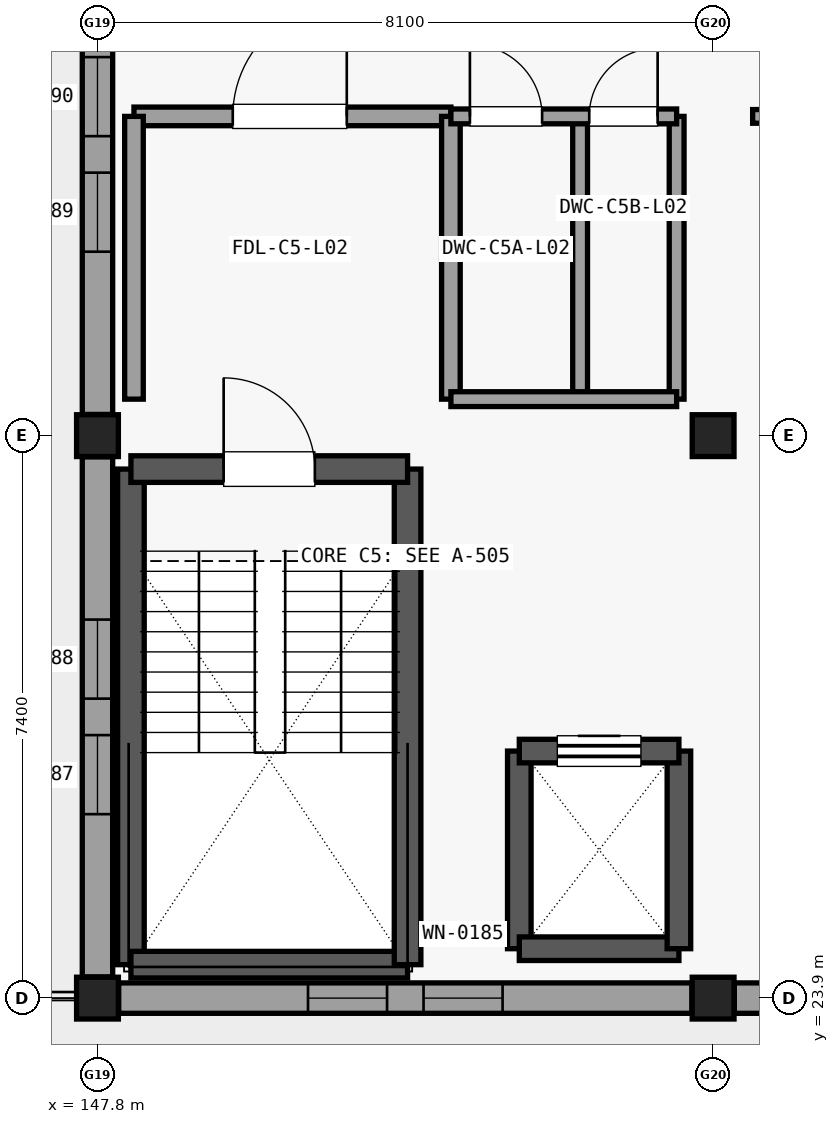
"""IFC4 building model, lengths in metres.
Left out: names, types, materials, properties, quantities, classifications, styles, units other than length and angle.
Written with IfcOpenShell. Run it as: python <this file> out.ifc"""

import sys

from ifc_helpers import new_model, si_unit, direction, frame, frame_2d, origin, origin_2d, place, context, subcontext, project, spatial, rectangle, extrude, element, fill, save


model = new_model("IFC4")
c1 = context("Model", 3, precision=1e-05, world=origin(), true_north=direction((0.0, 1.0)))
c2 = subcontext(c1, "Body", "Model", "MODEL_VIEW")
j1 = project(units=[si_unit("LENGTHUNIT", "METRE"), si_unit("PLANEANGLEUNIT", "RADIAN")], contexts=[c1])
p1 = place(None, origin())
s1 = spatial("IfcSite", under=j1, at=p1, CompositionType="ELEMENT")
p2 = place(p1, origin())
s2 = spatial("IfcBuilding", under=s1, at=p2, CompositionType="ELEMENT")
p3 = place(p2, frame((0.0, 0.0, 10.2)))
s3 = spatial("IfcBuildingStorey", under=s2, at=p3, CompositionType="ELEMENT", Elevation=10.2)
for number, where, z_axis, x_axis in (
    (1, (147.8, 23.9, 0.0), (0.0, 0.0, 1.0), (1.0, 0.0, 0.0)),
    (2, (147.8, 31.3, 0.0), (0.0, 0.0, 1.0), (1.0, 0.0, 0.0)),
    (3, (155.9, 23.9, 0.0), (0.0, 0.0, 1.0), (1.0, 0.0, 0.0)),
    (4, (155.9, 31.3, 0.0), (0.0, 0.0, 1.0), (1.0, 0.0, 0.0)),
):
    element("IfcColumn", number, at=place(p3, frame(where, z_axis=z_axis, x_axis=x_axis)), inside=s3, PredefinedType="COLUMN", context=c2, shape_type="SweptSolid", body=[
        extrude(rectangle(XDim=0.55, YDim=0.55, at=origin_2d()), origin(), (0.0, 0.0, 1.0), 3.37),
    ])
p4 = place(p3, frame((155.621, 23.9, 0.0), z_axis=(0.0, 0.0, 1.0), x_axis=(-1.0, 0.0, 0.0)))
e5 = element("IfcWall", 5, at=p4, inside=s3, PredefinedType="SOLIDWALL", context=c2, shape_type="SweptSolid", body=[
    extrude(rectangle(XDim=7.542, YDim=0.4, at=frame_2d((3.771, 0.0))), origin(), (0.0, 0.0, 1.0), 2.898),
])
p5 = place(p4, frame((2.491, 0.0, 0.6)))
e6 = element("IfcOpeningElement", 6, at=p5, cuts=e5, PredefinedType="OPENING", context=c2, shape_type="SweptSolid", body=[
    extrude(rectangle(XDim=1.04, YDim=2.06, at=frame_2d((0.52, 1.03))), frame((0.0, 0.21, 0.0), z_axis=(0.0, -1.0, 0.0), x_axis=(1.0, 0.0, 0.0)), (0.0, 0.0, 1.0), 0.42),
])
p6 = place(p4, frame((4.011, 0.0, 0.6)))
e7 = element("IfcOpeningElement", 7, at=p6, cuts=e5, PredefinedType="OPENING", context=c2, shape_type="SweptSolid", body=[
    extrude(rectangle(XDim=1.04, YDim=2.06, at=frame_2d((0.52, 1.03))), frame((0.0, 0.21, 0.0), z_axis=(0.0, -1.0, 0.0), x_axis=(1.0, 0.0, 0.0)), (0.0, 0.0, 1.0), 0.42),
])
p7 = place(p3, frame((147.8, 24.179, 0.0), z_axis=(0.0, 0.0, 1.0), x_axis=(0.0, 1.0, 0.0)))
e8 = element("IfcWall", 8, at=p7, inside=s3, PredefinedType="SOLIDWALL", context=c2, shape_type="SweptSolid", body=[
    extrude(rectangle(XDim=6.842, YDim=0.4, at=frame_2d((3.421, 0.0))), origin(), (0.0, 0.0, 1.0), 2.898),
])
p8 = place(p7, frame((2.141, 0.0, 0.6)))
e9 = element("IfcOpeningElement", 9, at=p8, cuts=e8, PredefinedType="OPENING", context=c2, shape_type="SweptSolid", body=[
    extrude(rectangle(XDim=1.04, YDim=2.06, at=frame_2d((0.52, 1.03))), frame((0.0, 0.21, 0.0), z_axis=(0.0, -1.0, 0.0), x_axis=(1.0, 0.0, 0.0)), (0.0, 0.0, 1.0), 0.42),
])
p9 = place(p7, frame((3.661, 0.0, 0.6)))
e10 = element("IfcOpeningElement", 10, at=p9, cuts=e8, PredefinedType="OPENING", context=c2, shape_type="SweptSolid", body=[
    extrude(rectangle(XDim=1.04, YDim=2.06, at=frame_2d((0.52, 1.03))), frame((0.0, 0.21, 0.0), z_axis=(0.0, -1.0, 0.0), x_axis=(1.0, 0.0, 0.0)), (0.0, 0.0, 1.0), 0.42),
])
p10 = place(p3, frame((147.8, 31.579, 0.0), z_axis=(0.0, 0.0, 1.0), x_axis=(0.0, 1.0, 0.0)))
e11 = element("IfcWall", 11, at=p10, inside=s3, PredefinedType="SOLIDWALL", context=c2, shape_type="SweptSolid", body=[
    extrude(rectangle(XDim=6.842, YDim=0.4, at=frame_2d((3.421, 0.0))), origin(), (0.0, 0.0, 1.0), 2.898),
])
p11 = place(p10, frame((2.141, 0.0, 0.6)))
e12 = element("IfcOpeningElement", 12, at=p11, cuts=e11, PredefinedType="OPENING", context=c2, shape_type="SweptSolid", body=[
    extrude(rectangle(XDim=1.04, YDim=2.06, at=frame_2d((0.52, 1.03))), frame((0.0, 0.21, 0.0), z_axis=(0.0, -1.0, 0.0), x_axis=(1.0, 0.0, 0.0)), (0.0, 0.0, 1.0), 0.42),
])
p12 = place(p10, frame((3.661, 0.0, 0.6)))
e13 = element("IfcOpeningElement", 13, at=p12, cuts=e11, PredefinedType="OPENING", context=c2, shape_type="SweptSolid", body=[
    extrude(rectangle(XDim=1.04, YDim=2.06, at=frame_2d((0.52, 1.03))), frame((0.0, 0.21, 0.0), z_axis=(0.0, -1.0, 0.0), x_axis=(1.0, 0.0, 0.0)), (0.0, 0.0, 1.0), 0.42),
])
p13 = place(p3, frame((163.721, 23.9, 0.0), z_axis=(0.0, 0.0, 1.0), x_axis=(-1.0, 0.0, 0.0)))
e14 = element("IfcWall", 14, at=p13, inside=s3, PredefinedType="SOLIDWALL", context=c2, shape_type="SweptSolid", body=[
    extrude(rectangle(XDim=7.542, YDim=0.4, at=frame_2d((3.771, 0.0))), origin(), (0.0, 0.0, 1.0), 2.898),
])
p14 = place(p13, frame((2.491, 0.0, 0.6)))
e15 = element("IfcOpeningElement", 15, at=p14, cuts=e14, PredefinedType="OPENING", context=c2, shape_type="SweptSolid", body=[
    extrude(rectangle(XDim=1.04, YDim=2.06, at=frame_2d((0.52, 1.03))), frame((0.0, 0.21, 0.0), z_axis=(0.0, -1.0, 0.0), x_axis=(1.0, 0.0, 0.0)), (0.0, 0.0, 1.0), 0.42),
])
p15 = place(p13, frame((4.011, 0.0, 0.6)))
e16 = element("IfcOpeningElement", 16, at=p15, cuts=e14, PredefinedType="OPENING", context=c2, shape_type="SweptSolid", body=[
    extrude(rectangle(XDim=1.04, YDim=2.06, at=frame_2d((0.52, 1.03))), frame((0.0, 0.21, 0.0), z_axis=(0.0, -1.0, 0.0), x_axis=(1.0, 0.0, 0.0)), (0.0, 0.0, 1.0), 0.42),
])
p16 = place(p3, frame((148.24, 24.34, 0.0), z_axis=(0.0, 0.0, 1.0), x_axis=(0.0, 1.0, 0.0)))
e17 = element("IfcWall", 17, at=p16, inside=s3, PredefinedType="SHEAR", context=c2, shape_type="SweptSolid", body=[
    extrude(rectangle(XDim=6.52, YDim=0.35, at=frame_2d((3.26, 0.0))), origin(), (0.0, 0.0, 1.0), 3.365),
])
p17 = place(p3, frame((148.24, 24.34, 0.0), z_axis=(0.0, 0.0, 1.0), x_axis=(1.0, 0.0, 0.0)))
e18 = element("IfcWall", 18, at=p17, inside=s3, PredefinedType="SHEAR", context=c2, shape_type="SweptSolid", body=[
    extrude(rectangle(XDim=3.64, YDim=0.35, at=frame_2d((1.82, 0.0))), origin(), (0.0, 0.0, 1.0), 3.365),
])
p18 = place(p3, frame((151.88, 24.34, 0.0), z_axis=(0.0, 0.0, 1.0), x_axis=(0.0, 1.0, 0.0)))
e19 = element("IfcWall", 19, at=p18, inside=s3, PredefinedType="SHEAR", context=c2, shape_type="SweptSolid", body=[
    extrude(rectangle(XDim=6.52, YDim=0.35, at=frame_2d((3.26, 0.0))), origin(), (0.0, 0.0, 1.0), 3.365),
])
p19 = place(p3, frame((148.24, 30.86, 0.0), z_axis=(0.0, 0.0, 1.0), x_axis=(1.0, 0.0, 0.0)))
e20 = element("IfcWall", 20, at=p19, inside=s3, PredefinedType="SHEAR", context=c2, shape_type="SweptSolid", body=[
    extrude(rectangle(XDim=3.64, YDim=0.35, at=frame_2d((1.82, 0.0))), origin(), (0.0, 0.0, 1.0), 3.365),
])
p20 = place(p19, frame((1.22, 0.0, 0.0)))
e21 = element("IfcOpeningElement", 21, at=p20, cuts=e20, PredefinedType="OPENING", context=c2, shape_type="SweptSolid", body=[
    extrude(rectangle(XDim=1.2, YDim=2.15, at=frame_2d((0.6, 1.075))), frame((0.0, 0.185, 0.0), z_axis=(0.0, -1.0, 0.0), x_axis=(1.0, 0.0, 0.0)), (0.0, 0.0, 1.0), 0.37),
])
p21 = place(p3, frame((153.35, 24.55, 0.0), z_axis=(0.0, 0.0, 1.0), x_axis=(0.0, 1.0, 0.0)))
e22 = element("IfcWall", 22, at=p21, inside=s3, PredefinedType="SHEAR", context=c2, shape_type="SweptSolid", body=[
    extrude(rectangle(XDim=2.6, YDim=0.31, at=frame_2d((1.3, 0.0))), origin(), (0.0, 0.0, 1.0), 3.365),
])
p22 = place(p3, frame((153.35, 24.55, 0.0), z_axis=(0.0, 0.0, 1.0), x_axis=(1.0, 0.0, 0.0)))
e23 = element("IfcWall", 23, at=p22, inside=s3, PredefinedType="SHEAR", context=c2, shape_type="SweptSolid", body=[
    extrude(rectangle(XDim=2.1, YDim=0.31, at=frame_2d((1.05, 0.0))), origin(), (0.0, 0.0, 1.0), 3.365),
])
p23 = place(p3, frame((155.45, 24.55, 0.0), z_axis=(0.0, 0.0, 1.0), x_axis=(0.0, 1.0, 0.0)))
e24 = element("IfcWall", 24, at=p23, inside=s3, PredefinedType="SHEAR", context=c2, shape_type="SweptSolid", body=[
    extrude(rectangle(XDim=2.6, YDim=0.31, at=frame_2d((1.3, 0.0))), origin(), (0.0, 0.0, 1.0), 3.365),
])
p24 = place(p3, frame((153.35, 27.15, 0.0), z_axis=(0.0, 0.0, 1.0), x_axis=(1.0, 0.0, 0.0)))
e25 = element("IfcWall", 25, at=p24, inside=s3, PredefinedType="SHEAR", context=c2, shape_type="SweptSolid", body=[
    extrude(rectangle(XDim=2.1, YDim=0.31, at=frame_2d((1.05, 0.0))), origin(), (0.0, 0.0, 1.0), 3.365),
])
p25 = place(p24, frame((0.5, 0.0, 0.0)))
e26 = element("IfcOpeningElement", 26, at=p25, cuts=e25, PredefinedType="OPENING", context=c2, shape_type="SweptSolid", body=[
    extrude(rectangle(XDim=1.1, YDim=2.15, at=frame_2d((0.55, 1.075))), frame((0.0, 0.165, 0.0), z_axis=(0.0, -1.0, 0.0), x_axis=(1.0, 0.0, 0.0)), (0.0, 0.0, 1.0), 0.33),
])
p26 = place(p3, frame((148.28, 35.5, 0.0), z_axis=(0.0, 0.0, 1.0), x_axis=(1.0, 0.0, 0.0)))
e27 = element("IfcWall", 27, at=p26, inside=s3, PredefinedType="PARTITIONING", context=c2, shape_type="SweptSolid", body=[
    extrude(rectangle(XDim=4.17, YDim=0.245, at=frame_2d((2.085, 0.0))), origin(), (0.0, 0.0, 1.0), 2.903),
])
p27 = place(p26, frame((1.3, 0.0, 0.0)))
e28 = element("IfcOpeningElement", 28, at=p27, cuts=e27, PredefinedType="OPENING", context=c2, shape_type="SweptSolid", body=[
    extrude(rectangle(XDim=1.5, YDim=2.15, at=frame_2d((0.75, 1.075))), frame((0.0, 0.133, 0.0), z_axis=(0.0, -1.0, 0.0), x_axis=(1.0, 0.0, 0.0)), (0.0, 0.0, 1.0), 0.265),
])
for number, where, z_axis, x_axis in (
    (29, (148.28, 31.78, 0.0), (0.0, 0.0, 1.0), (0.0, 1.0, 0.0)),
    (30, (152.45, 31.78, 0.0), (0.0, 0.0, 1.0), (0.0, 1.0, 0.0)),
):
    element("IfcWall", number, at=place(p3, frame(where, z_axis=z_axis, x_axis=x_axis)), inside=s3, PredefinedType="PARTITIONING", context=c2, shape_type="SweptSolid", body=[
        extrude(rectangle(XDim=3.72, YDim=0.245, at=frame_2d((1.86, 0.0))), origin(), (0.0, 0.0, 1.0), 2.903),
    ])
for number, where, z_axis, x_axis in (
    (31, (154.15, 31.78, 0.0), (0.0, 0.0, 1.0), (0.0, 1.0, 0.0)),
    (32, (155.42, 31.78, 0.0), (0.0, 0.0, 1.0), (0.0, 1.0, 0.0)),
):
    element("IfcWall", number, at=place(p3, frame(where, z_axis=z_axis, x_axis=x_axis)), inside=s3, PredefinedType="PARTITIONING", context=c2, shape_type="SweptSolid", body=[
        extrude(rectangle(XDim=3.72, YDim=0.195, at=frame_2d((1.86, 0.0))), origin(), (0.0, 0.0, 1.0), 2.903),
    ])
p28 = place(p3, frame((152.45, 31.78, 0.0), z_axis=(0.0, 0.0, 1.0), x_axis=(1.0, 0.0, 0.0)))
e33 = element("IfcWall", 33, at=p28, inside=s3, PredefinedType="PARTITIONING", context=c2, shape_type="SweptSolid", body=[
    extrude(rectangle(XDim=2.97, YDim=0.195, at=frame_2d((1.485, 0.0))), origin(), (0.0, 0.0, 1.0), 2.903),
])
p29 = place(p3, frame((152.45, 35.5, 0.0), z_axis=(0.0, 0.0, 1.0), x_axis=(1.0, 0.0, 0.0)))
e34 = element("IfcWall", 34, at=p29, inside=s3, PredefinedType="PARTITIONING", context=c2, shape_type="SweptSolid", body=[
    extrude(rectangle(XDim=2.97, YDim=0.195, at=frame_2d((1.485, 0.0))), origin(), (0.0, 0.0, 1.0), 2.903),
])
p30 = place(p29, frame((0.25, 0.0, 0.0)))
e35 = element("IfcOpeningElement", 35, at=p30, cuts=e34, PredefinedType="OPENING", context=c2, shape_type="SweptSolid", body=[
    extrude(rectangle(XDim=0.95, YDim=2.1, at=frame_2d((0.475, 1.05))), frame((0.0, 0.107, 0.0), z_axis=(0.0, -1.0, 0.0), x_axis=(1.0, 0.0, 0.0)), (0.0, 0.0, 1.0), 0.215),
])
p31 = place(p29, frame((1.82, 0.0, 0.0)))
e36 = element("IfcOpeningElement", 36, at=p31, cuts=e34, PredefinedType="OPENING", context=c2, shape_type="SweptSolid", body=[
    extrude(rectangle(XDim=0.9, YDim=2.1, at=frame_2d((0.45, 1.05))), frame((0.0, 0.107, 0.0), z_axis=(0.0, -1.0, 0.0), x_axis=(1.0, 0.0, 0.0)), (0.0, 0.0, 1.0), 0.215),
])
p32 = place(p3, frame((156.42, 35.5, 0.0), z_axis=(0.0, 0.0, 1.0), x_axis=(1.0, 0.0, 0.0)))
e37 = element("IfcWall", 37, at=p32, inside=s3, PredefinedType="PARTITIONING", context=c2, shape_type="SweptSolid", body=[
    extrude(rectangle(XDim=7.06, YDim=0.18, at=frame_2d((3.53, 0.0))), origin(), (0.0, 0.0, 1.0), 2.903),
])
p33 = place(p32, frame((2.955, 0.0, 0.0)))
e38 = element("IfcOpeningElement", 38, at=p33, cuts=e37, PredefinedType="OPENING", context=c2, shape_type="SweptSolid", body=[
    extrude(rectangle(XDim=1.15, YDim=2.15, at=frame_2d((0.575, 1.075))), frame((0.0, 0.1, 0.0), z_axis=(0.0, -1.0, 0.0), x_axis=(1.0, 0.0, 0.0)), (0.0, 0.0, 1.0), 0.2),
])
p34 = place(p5, origin())
e39 = element("IfcWindow", 39, at=p34, inside=s3, PartitioningType="SINGLE_PANEL", PredefinedType="WINDOW", context=c2, shape_type="SweptSolid", body=[
    extrude(rectangle(XDim=1.04, YDim=2.06, at=frame_2d((0.52, 1.03))), frame((0.0, 0.03, 0.0), z_axis=(0.0, -1.0, 0.0), x_axis=(1.0, 0.0, 0.0)), (0.0, 0.0, 1.0), 0.06),
])
fill(e6, e39)
p35 = place(p6, origin())
e40 = element("IfcWindow", 40, at=p35, inside=s3, PartitioningType="SINGLE_PANEL", PredefinedType="WINDOW", context=c2, shape_type="SweptSolid", body=[
    extrude(rectangle(XDim=1.04, YDim=2.06, at=frame_2d((0.52, 1.03))), frame((0.0, 0.03, 0.0), z_axis=(0.0, -1.0, 0.0), x_axis=(1.0, 0.0, 0.0)), (0.0, 0.0, 1.0), 0.06),
])
fill(e7, e40)
p36 = place(p8, origin())
e41 = element("IfcWindow", 41, at=p36, inside=s3, PartitioningType="SINGLE_PANEL", PredefinedType="WINDOW", context=c2, shape_type="SweptSolid", body=[
    extrude(rectangle(XDim=1.04, YDim=2.06, at=frame_2d((0.52, 1.03))), frame((0.0, 0.03, 0.0), z_axis=(0.0, -1.0, 0.0), x_axis=(1.0, 0.0, 0.0)), (0.0, 0.0, 1.0), 0.06),
])
fill(e9, e41)
p37 = place(p9, origin())
e42 = element("IfcWindow", 42, at=p37, inside=s3, PartitioningType="SINGLE_PANEL", PredefinedType="WINDOW", context=c2, shape_type="SweptSolid", body=[
    extrude(rectangle(XDim=1.04, YDim=2.06, at=frame_2d((0.52, 1.03))), frame((0.0, 0.03, 0.0), z_axis=(0.0, -1.0, 0.0), x_axis=(1.0, 0.0, 0.0)), (0.0, 0.0, 1.0), 0.06),
])
fill(e10, e42)
p38 = place(p11, origin())
e43 = element("IfcWindow", 43, at=p38, inside=s3, PartitioningType="SINGLE_PANEL", PredefinedType="WINDOW", context=c2, shape_type="SweptSolid", body=[
    extrude(rectangle(XDim=1.04, YDim=2.06, at=frame_2d((0.52, 1.03))), frame((0.0, 0.03, 0.0), z_axis=(0.0, -1.0, 0.0), x_axis=(1.0, 0.0, 0.0)), (0.0, 0.0, 1.0), 0.06),
])
fill(e12, e43)
p39 = place(p12, origin())
e44 = element("IfcWindow", 44, at=p39, inside=s3, PartitioningType="SINGLE_PANEL", PredefinedType="WINDOW", context=c2, shape_type="SweptSolid", body=[
    extrude(rectangle(XDim=1.04, YDim=2.06, at=frame_2d((0.52, 1.03))), frame((0.0, 0.03, 0.0), z_axis=(0.0, -1.0, 0.0), x_axis=(1.0, 0.0, 0.0)), (0.0, 0.0, 1.0), 0.06),
])
fill(e13, e44)
p40 = place(p20, origin())
e45 = element("IfcDoor", 45, at=p40, inside=s3, OperationType="SINGLE_SWING_LEFT", PredefinedType="DOOR", context=c2, shape_type="SweptSolid", body=[
    extrude(rectangle(XDim=1.2, YDim=2.15, at=frame_2d((0.6, 1.075))), frame((0.0, 0.025, 0.0), z_axis=(0.0, -1.0, 0.0), x_axis=(1.0, 0.0, 0.0)), (0.0, 0.0, 1.0), 0.05),
])
fill(e21, e45)
p41 = place(p25, origin())
e46 = element("IfcDoor", 46, at=p41, inside=s3, OperationType="SLIDING_TO_LEFT", PredefinedType="DOOR", context=c2, shape_type="SweptSolid", body=[
    extrude(rectangle(XDim=1.1, YDim=2.15, at=frame_2d((0.55, 1.075))), frame((0.0, 0.025, 0.0), z_axis=(0.0, -1.0, 0.0), x_axis=(1.0, 0.0, 0.0)), (0.0, 0.0, 1.0), 0.05),
])
fill(e26, e46)
p42 = place(p27, origin())
e47 = element("IfcDoor", 47, at=p42, inside=s3, OperationType="SINGLE_SWING_RIGHT", PredefinedType="DOOR", context=c2, shape_type="SweptSolid", body=[
    extrude(rectangle(XDim=1.5, YDim=2.15, at=frame_2d((0.75, 1.075))), frame((0.0, 0.025, 0.0), z_axis=(0.0, -1.0, 0.0), x_axis=(1.0, 0.0, 0.0)), (0.0, 0.0, 1.0), 0.05),
])
fill(e28, e47)
p43 = place(p30, origin())
e48 = element("IfcDoor", 48, at=p43, inside=s3, OperationType="SINGLE_SWING_LEFT", PredefinedType="DOOR", context=c2, shape_type="SweptSolid", body=[
    extrude(rectangle(XDim=0.95, YDim=2.1, at=frame_2d((0.475, 1.05))), frame((0.0, 0.025, 0.0), z_axis=(0.0, -1.0, 0.0), x_axis=(1.0, 0.0, 0.0)), (0.0, 0.0, 1.0), 0.05),
])
fill(e35, e48)
p44 = place(p31, origin())
e49 = element("IfcDoor", 49, at=p44, inside=s3, OperationType="SINGLE_SWING_RIGHT", PredefinedType="DOOR", context=c2, shape_type="SweptSolid", body=[
    extrude(rectangle(XDim=0.9, YDim=2.1, at=frame_2d((0.45, 1.05))), frame((0.0, 0.025, 0.0), z_axis=(0.0, -1.0, 0.0), x_axis=(1.0, 0.0, 0.0)), (0.0, 0.0, 1.0), 0.05),
])
fill(e36, e49)
save(model, sys.argv[1])
